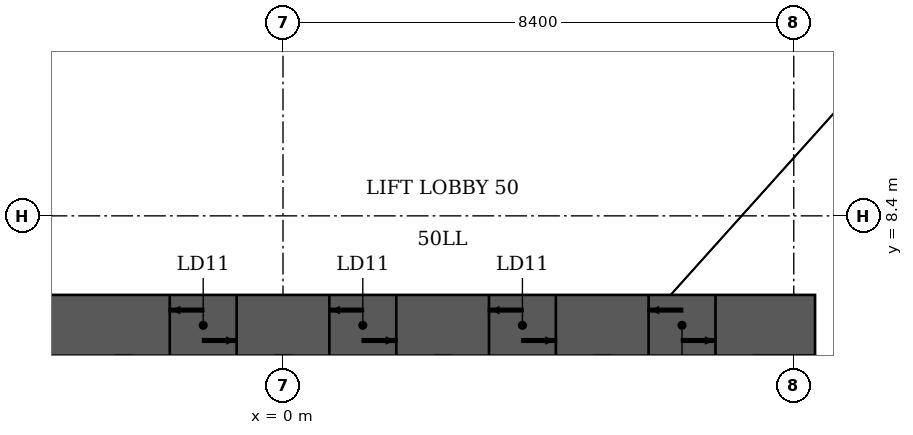
"""IFC4 building model, lengths in metres.
Left out: names, types, materials, properties, quantities, classifications, styles, units other than length and angle.
Written with IfcOpenShell. Run it as: python <this file> out.ifc"""

import sys

from ifc_helpers import new_model, si_unit, direction, frame, frame_2d, origin, place, context, subcontext, project, spatial, rectangle, extrude, element, fill, save


model = new_model("IFC4")
c1 = context("Model", 3, precision=1e-05, world=origin(), true_north=direction((0.0, 1.0)))
c2 = subcontext(c1, "Body", "Model", "MODEL_VIEW")
j1 = project(units=[si_unit("LENGTHUNIT", "METRE"), si_unit("PLANEANGLEUNIT", "RADIAN")], contexts=[c1])
p1 = place(None, origin())
s1 = spatial("IfcSite", under=j1, at=p1, CompositionType="ELEMENT")
p2 = place(p1, origin())
s2 = spatial("IfcBuilding", under=s1, at=p2, CompositionType="ELEMENT")
p3 = place(p2, frame((0.0, 0.0, 202.2)))
s3 = spatial("IfcBuildingStorey", under=s2, at=p3, CompositionType="ELEMENT", Elevation=202.2)
p4 = place(p3, frame((-8.75, 6.6, 0.0), z_axis=(0.0, 0.0, 1.0), x_axis=(1.0, 0.0, 0.0)))
e1 = element("IfcWall", 1, at=p4, inside=s3, PredefinedType="SHEAR", context=c2, shape_type="SweptSolid", body=[
    extrude(rectangle(XDim=17.5, YDim=1.0, at=frame_2d((8.75, 0.0))), origin(), (0.0, 0.0, 1.0), 3.8),
])
p5 = place(p4, frame((6.887, 0.0, 0.0)))
e2 = element("IfcOpeningElement", 2, at=p5, cuts=e1, PredefinedType="OPENING", context=c2, shape_type="SweptSolid", body=[
    extrude(rectangle(XDim=1.1, YDim=2.1, at=frame_2d((0.55, 1.05))), frame((0.0, 0.5, 0.0), z_axis=(0.0, -1.0, 0.0), x_axis=(1.0, 0.0, 0.0)), (0.0, 0.0, 1.0), 1.0),
])
p6 = place(p4, frame((9.512, 0.0, 0.0)))
e3 = element("IfcOpeningElement", 3, at=p6, cuts=e1, PredefinedType="OPENING", context=c2, shape_type="SweptSolid", body=[
    extrude(rectangle(XDim=1.1, YDim=2.1, at=frame_2d((0.55, 1.05))), frame((0.0, 0.5, 0.0), z_axis=(0.0, -1.0, 0.0), x_axis=(1.0, 0.0, 0.0)), (0.0, 0.0, 1.0), 1.0),
])
p7 = place(p4, frame((12.137, 0.0, 0.0)))
e4 = element("IfcOpeningElement", 4, at=p7, cuts=e1, PredefinedType="OPENING", context=c2, shape_type="SweptSolid", body=[
    extrude(rectangle(XDim=1.1, YDim=2.1, at=frame_2d((0.55, 1.05))), frame((0.0, 0.5, 0.0), z_axis=(0.0, -1.0, 0.0), x_axis=(1.0, 0.0, 0.0)), (0.0, 0.0, 1.0), 1.0),
])
p8 = place(p4, frame((14.762, 0.0, 0.0)))
e5 = element("IfcOpeningElement", 5, at=p8, cuts=e1, PredefinedType="OPENING", context=c2, shape_type="SweptSolid", body=[
    extrude(rectangle(XDim=1.1, YDim=2.1, at=frame_2d((0.55, 1.05))), frame((0.0, 0.5, 0.0), z_axis=(0.0, -1.0, 0.0), x_axis=(1.0, 0.0, 0.0)), (0.0, 0.0, 1.0), 1.0),
])
p9 = place(p5, origin())
e6 = element("IfcDoor", 6, at=p9, inside=s3, OperationType="DOUBLE_DOOR_SLIDING", PredefinedType="DOOR", context=c2, shape_type="SweptSolid", body=[
    extrude(rectangle(XDim=1.1, YDim=2.1, at=frame_2d((0.55, 1.05))), frame((0.0, 0.025, 0.0), z_axis=(0.0, -1.0, 0.0), x_axis=(1.0, 0.0, 0.0)), (0.0, 0.0, 1.0), 0.05),
])
fill(e2, e6)
p10 = place(p6, origin())
e7 = element("IfcDoor", 7, at=p10, inside=s3, OperationType="DOUBLE_DOOR_SLIDING", PredefinedType="DOOR", context=c2, shape_type="SweptSolid", body=[
    extrude(rectangle(XDim=1.1, YDim=2.1, at=frame_2d((0.55, 1.05))), frame((0.0, 0.025, 0.0), z_axis=(0.0, -1.0, 0.0), x_axis=(1.0, 0.0, 0.0)), (0.0, 0.0, 1.0), 0.05),
])
fill(e3, e7)
p11 = place(p7, origin())
e8 = element("IfcDoor", 8, at=p11, inside=s3, OperationType="DOUBLE_DOOR_SLIDING", PredefinedType="DOOR", context=c2, shape_type="SweptSolid", body=[
    extrude(rectangle(XDim=1.1, YDim=2.1, at=frame_2d((0.55, 1.05))), frame((0.0, 0.025, 0.0), z_axis=(0.0, -1.0, 0.0), x_axis=(1.0, 0.0, 0.0)), (0.0, 0.0, 1.0), 0.05),
])
fill(e4, e8)
p12 = place(p8, origin())
e9 = element("IfcDoor", 9, at=p12, inside=s3, OperationType="DOUBLE_DOOR_SLIDING", PredefinedType="DOOR", context=c2, shape_type="SweptSolid", body=[
    extrude(rectangle(XDim=1.1, YDim=2.1, at=frame_2d((0.55, 1.05))), frame((0.0, 0.025, 0.0), z_axis=(0.0, -1.0, 0.0), x_axis=(1.0, 0.0, 0.0)), (0.0, 0.0, 1.0), 0.05),
])
fill(e5, e9)
save(model, sys.argv[1])
